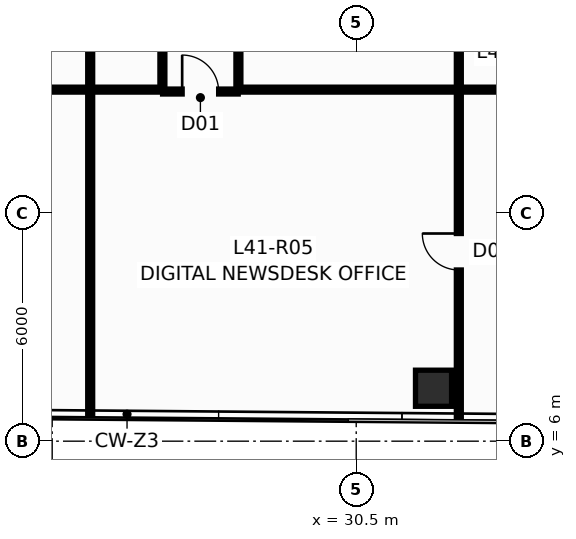
"""IFC4 building model, lengths in metres.
Left out: names, types, materials, properties, quantities, classifications, styles, units other than length and angle.
Written with IfcOpenShell. Run it as: python <this file> out.ifc"""

import sys

from ifc_helpers import new_model, si_unit, direction, frame, frame_2d, origin, origin_2d, place, context, subcontext, project, spatial, rectangle, hollow_rectangle, extrude, source, transform, mapped, element, fill, save


model = new_model("IFC4")
c1 = context("Model", 3, precision=1e-05, world=origin(), true_north=direction((0.0, 1.0)))
c2 = subcontext(c1, "Body", "Model", "MODEL_VIEW")
j1 = project(units=[si_unit("LENGTHUNIT", "METRE"), si_unit("PLANEANGLEUNIT", "RADIAN")], contexts=[c1])
p1 = place(None, origin())
s1 = spatial("IfcSite", under=j1, at=p1, CompositionType="ELEMENT")
p2 = place(p1, origin())
s2 = spatial("IfcBuilding", under=s1, at=p2, CompositionType="ELEMENT")
p3 = place(p2, frame((0.0, 0.0, 158.5)))
s3 = spatial("IfcBuildingStorey", under=s2, at=p3, CompositionType="ELEMENT", Elevation=158.5)
m1 = source(origin(), c2, "Body", "SweptSolid", [
    extrude(hollow_rectangle(XDim=0.95, YDim=0.95, WallThickness=0.05, at=origin_2d()), origin(), (0.0, 0.0, 1.0), 3.651),
])
p4 = place(p3, frame((32.535, 7.393, 0.0), z_axis=(-0.004480682206, 0.019795252729, 0.999794014513), x_axis=(-0.975326687046, -0.220766513622, 0.0)))
e1 = element("IfcColumn", 1, at=p4, inside=s3, PredefinedType="COLUMN", context=c2, shape_type="MappedRepresentation", body=[
    mapped(m1, transform((0.0, 0.0, 0.0), scale=1.0)),
])
p5 = place(p3, frame((12.972, 15.25, 0.0), z_axis=(0.0, 0.0, 1.0), x_axis=(1.0, 0.0, 0.0)))
e2 = element("IfcWall", 2, at=p5, inside=s3, PredefinedType="PARTITIONING", context=c2, shape_type="SweptSolid", body=[
    extrude(rectangle(XDim=10.523, YDim=0.13, at=frame_2d((5.261, 0.0))), origin(), (0.0, 0.0, 1.0), 3.4),
])
p6 = place(p5, frame((4.838, 0.0, 0.0)))
e3 = element("IfcOpeningElement", 3, at=p6, cuts=e2, PredefinedType="OPENING", context=c2, shape_type="SweptSolid", body=[
    extrude(rectangle(XDim=0.96, YDim=2.15, at=frame_2d((0.48, 1.075))), frame((0.0, 0.077, 0.0), z_axis=(0.0, -1.0, 0.0), x_axis=(1.0, 0.0, 0.0)), (0.0, 0.0, 1.0), 0.154),
])
p7 = place(p3, frame((33.205, 15.25, 0.0), z_axis=(0.0, 0.0, 1.0), x_axis=(1.0, 0.0, 0.0)))
e4 = element("IfcWall", 4, at=p7, inside=s3, PredefinedType="PARTITIONING", context=c2, shape_type="SweptSolid", body=[
    extrude(rectangle(XDim=9.59, YDim=0.13, at=frame_2d((4.795, 0.0))), origin(), (0.0, 0.0, 1.0), 3.4),
])
p8 = place(p7, frame((4.315, 0.0, 0.0)))
e5 = element("IfcOpeningElement", 5, at=p8, cuts=e4, PredefinedType="OPENING", context=c2, shape_type="SweptSolid", body=[
    extrude(rectangle(XDim=0.96, YDim=2.15, at=frame_2d((0.48, 1.075))), frame((0.0, 0.077, 0.0), z_axis=(0.0, -1.0, 0.0), x_axis=(1.0, 0.0, 0.0)), (0.0, 0.0, 1.0), 0.154),
])
p9 = place(p3, frame((33.2, 6.632, 0.0), z_axis=(0.0, 0.0, 1.0), x_axis=(0.0, 1.0, 0.0)))
e6 = element("IfcWall", 6, at=p9, inside=s3, PredefinedType="PARTITIONING", context=c2, shape_type="SweptSolid", body=[
    extrude(rectangle(XDim=8.613, YDim=0.13, at=frame_2d((4.306, 0.0))), origin(), (0.0, 0.0, 1.0), 3.4),
])
p10 = place(p9, frame((3.872, 0.0, 0.0)))
e7 = element("IfcOpeningElement", 7, at=p10, cuts=e6, PredefinedType="OPENING", context=c2, shape_type="SweptSolid", body=[
    extrude(rectangle(XDim=0.96, YDim=2.15, at=frame_2d((0.48, 1.075))), frame((0.0, 0.077, 0.0), z_axis=(0.0, -1.0, 0.0), x_axis=(1.0, 0.0, 0.0)), (0.0, 0.0, 1.0), 0.154),
])
p11 = place(p3, frame((23.5, 6.713, 0.0), z_axis=(0.0, 0.0, 1.0), x_axis=(0.0, 1.0, 0.0)))
e8 = element("IfcWall", 8, at=p11, inside=s3, PredefinedType="PARTITIONING", context=c2, shape_type="SweptSolid", body=[
    extrude(rectangle(XDim=8.532, YDim=0.13, at=frame_2d((4.266, 0.0))), origin(), (0.0, 0.0, 1.0), 3.4),
])
p12 = place(p3, frame((25.4, 15.255, 0.0), z_axis=(0.0, 0.0, 1.0), x_axis=(0.0, 1.0, 0.0)))
e9 = element("IfcWall", 9, at=p12, inside=s3, PredefinedType="PARTITIONING", context=c2, shape_type="SweptSolid", body=[
    extrude(rectangle(XDim=7.94, YDim=0.13, at=frame_2d((3.97, 0.0))), origin(), (0.0, 0.0, 1.0), 3.078),
])
p13 = place(p12, frame((3.49, 0.0, 0.0)))
e10 = element("IfcOpeningElement", 10, at=p13, cuts=e9, PredefinedType="OPENING", context=c2, shape_type="SweptSolid", body=[
    extrude(rectangle(XDim=0.96, YDim=2.15, at=frame_2d((0.48, 1.075))), frame((0.0, 0.077, 0.0), z_axis=(0.0, -1.0, 0.0), x_axis=(1.0, 0.0, 0.0)), (0.0, 0.0, 1.0), 0.154),
])
p14 = place(p3, frame((23.5, 15.255, 0.0), z_axis=(0.0, 0.0, 1.0), x_axis=(0.0, 1.0, 0.0)))
e11 = element("IfcWall", 11, at=p14, inside=s3, PredefinedType="PARTITIONING", context=c2, shape_type="SweptSolid", body=[
    extrude(rectangle(XDim=7.94, YDim=0.13, at=frame_2d((3.97, 0.0))), origin(), (0.0, 0.0, 1.0), 3.078),
])
p15 = place(p14, frame((3.49, 0.0, 0.0)))
e12 = element("IfcOpeningElement", 12, at=p15, cuts=e11, PredefinedType="OPENING", context=c2, shape_type="SweptSolid", body=[
    extrude(rectangle(XDim=0.96, YDim=2.15, at=frame_2d((0.48, 1.075))), frame((0.0, 0.077, 0.0), z_axis=(0.0, -1.0, 0.0), x_axis=(1.0, 0.0, 0.0)), (0.0, 0.0, 1.0), 0.154),
])
p16 = place(p3, frame((27.4, 15.255, 0.0), z_axis=(0.0, 0.0, 1.0), x_axis=(0.0, 1.0, 0.0)))
e13 = element("IfcWall", 13, at=p16, inside=s3, PredefinedType="PARTITIONING", context=c2, shape_type="SweptSolid", body=[
    extrude(rectangle(XDim=7.85, YDim=0.13, at=frame_2d((3.925, 0.0))), origin(), (0.0, 0.0, 1.0), 3.078),
])
p17 = place(p16, frame((3.445, 0.0, 0.0)))
e14 = element("IfcOpeningElement", 14, at=p17, cuts=e13, PredefinedType="OPENING", context=c2, shape_type="SweptSolid", body=[
    extrude(rectangle(XDim=0.96, YDim=2.15, at=frame_2d((0.48, 1.075))), frame((0.0, 0.077, 0.0), z_axis=(0.0, -1.0, 0.0), x_axis=(1.0, 0.0, 0.0)), (0.0, 0.0, 1.0), 0.154),
])
p18 = place(p3, frame((27.405, 15.25, 0.0), z_axis=(0.0, 0.0, 1.0), x_axis=(1.0, 0.0, 0.0)))
e15 = element("IfcWall", 15, at=p18, inside=s3, PredefinedType="PARTITIONING", context=c2, shape_type="SweptSolid", body=[
    extrude(rectangle(XDim=5.79, YDim=0.13, at=frame_2d((2.895, 0.0))), origin(), (0.0, 0.0, 1.0), 3.4),
])
p19 = place(p3, frame((25.405, 15.2, 0.0), z_axis=(0.0, 0.0, 1.0), x_axis=(1.0, 0.0, 0.0)))
e16 = element("IfcWall", 16, at=p19, inside=s3, PredefinedType="PARTITIONING", context=c2, shape_type="SweptSolid", body=[
    extrude(rectangle(XDim=1.99, YDim=0.13, at=frame_2d((0.995, 0.0))), origin(), (0.0, 0.0, 1.0), 3.4),
])
p20 = place(p19, frame((0.515, 0.0, 0.0)))
e17 = element("IfcOpeningElement", 17, at=p20, cuts=e16, PredefinedType="OPENING", context=c2, shape_type="SweptSolid", body=[
    extrude(rectangle(XDim=0.96, YDim=2.15, at=frame_2d((0.48, 1.075))), frame((0.0, 0.077, 0.0), z_axis=(0.0, -1.0, 0.0), x_axis=(1.0, 0.0, 0.0)), (0.0, 0.0, 1.0), 0.154),
])
p21 = place(p3, frame((23.505, 15.25, 0.0), z_axis=(0.0, 0.0, 1.0), x_axis=(1.0, 0.0, 0.0)))
e18 = element("IfcWall", 18, at=p21, inside=s3, PredefinedType="PARTITIONING", context=c2, shape_type="SweptSolid", body=[
    extrude(rectangle(XDim=1.89, YDim=0.13, at=frame_2d((0.945, 0.0))), origin(), (0.0, 0.0, 1.0), 3.4),
])
p22 = place(p3, frame((33.2, 15.255, 0.0), z_axis=(0.0, 0.0, 1.0), x_axis=(0.0, 1.0, 0.0)))
e19 = element("IfcWall", 19, at=p22, inside=s3, PredefinedType="PARTITIONING", context=c2, shape_type="SweptSolid", body=[
    extrude(rectangle(XDim=1.77, YDim=0.13, at=frame_2d((0.885, 0.0))), origin(), (0.0, 0.0, 1.0), 3.4),
])
p23 = place(p10, origin())
e20 = element("IfcDoor", 20, at=p23, inside=s3, OperationType="SINGLE_SWING_RIGHT", PredefinedType="DOOR", context=c2, shape_type="SweptSolid", body=[
    extrude(rectangle(XDim=0.96, YDim=2.15, at=frame_2d((0.48, 1.075))), frame((0.0, 0.025, 0.0), z_axis=(0.0, -1.0, 0.0), x_axis=(1.0, 0.0, 0.0)), (0.0, 0.0, 1.0), 0.05),
])
fill(e7, e20)
p24 = place(p20, origin())
e21 = element("IfcDoor", 21, at=p24, inside=s3, OperationType="SINGLE_SWING_LEFT", PredefinedType="DOOR", context=c2, shape_type="SweptSolid", body=[
    extrude(rectangle(XDim=0.96, YDim=2.15, at=frame_2d((0.48, 1.075))), frame((0.0, 0.025, 0.0), z_axis=(0.0, -1.0, 0.0), x_axis=(1.0, 0.0, 0.0)), (0.0, 0.0, 1.0), 0.05),
])
fill(e17, e21)
save(model, sys.argv[1])
